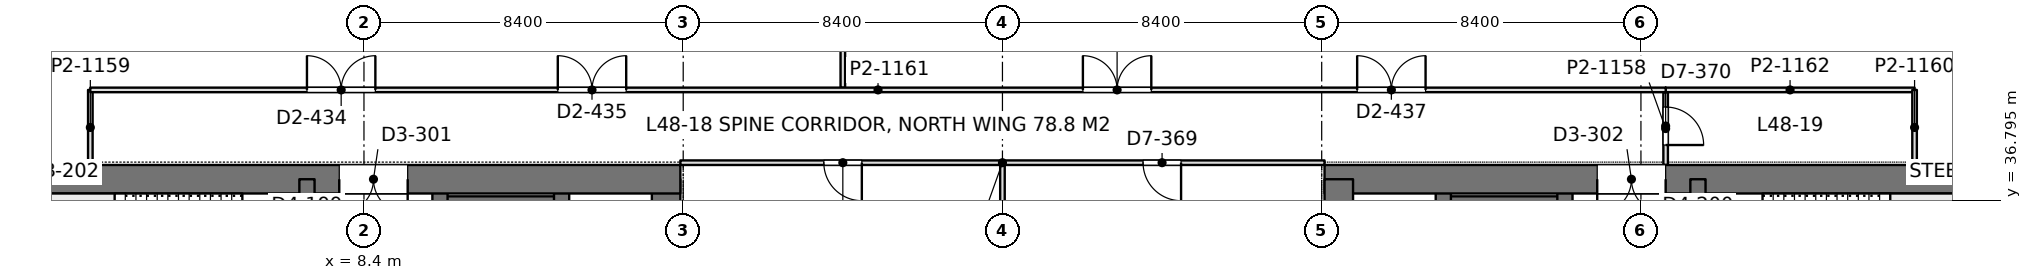
"""IFC4 building model, lengths in metres.
Left out: names, types, materials, properties, quantities, classifications, styles, units other than length and angle.
Written with IfcOpenShell. Run it as: python <this file> out.ifc"""

import sys

from ifc_helpers import new_model, si_unit, direction, frame, frame_2d, origin, place, context, subcontext, project, spatial, rectangle, extrude, element, fill, save


model = new_model("IFC4")
c1 = context("Model", 3, precision=1e-05, world=origin(), true_north=direction((0.0, 1.0)))
c2 = subcontext(c1, "Body", "Model", "MODEL_VIEW")
j1 = project(units=[si_unit("LENGTHUNIT", "METRE"), si_unit("PLANEANGLEUNIT", "RADIAN")], contexts=[c1])
p1 = place(None, origin())
s1 = spatial("IfcSite", under=j1, at=p1, CompositionType="ELEMENT")
p2 = place(p1, origin())
s2 = spatial("IfcBuilding", under=s1, at=p2, CompositionType="ELEMENT")
p3 = place(p2, frame((0.0, 0.0, 211.2)))
s3 = spatial("IfcBuildingStorey", under=s2, at=p3, CompositionType="ELEMENT", Elevation=211.2)
p4 = place(p3, frame((-1.125, 37.35, 0.0), z_axis=(0.0, 0.0, 1.0), x_axis=(1.0, 0.0, 0.0)))
e1 = element("IfcWall", 1, at=p4, inside=s3, PredefinedType="SHEAR", context=c2, shape_type="SweptSolid", body=[
    extrude(rectangle(XDim=17.85, YDim=0.75, at=frame_2d((8.925, 0.0))), origin(), (0.0, 0.0, 1.0), 4.2),
])
p5 = place(p4, frame((8.875, 0.0, 0.0)))
e2 = element("IfcOpeningElement", 2, at=p5, cuts=e1, PredefinedType="OPENING", context=c2, shape_type="SweptSolid", body=[
    extrude(rectangle(XDim=1.8, YDim=2.4, at=frame_2d((0.9, 1.2))), frame((0.0, 0.385, 0.0), z_axis=(0.0, -1.0, 0.0), x_axis=(1.0, 0.0, 0.0)), (0.0, 0.0, 1.0), 0.77),
])
p6 = place(p3, frame((16.35, 27.8, 0.0), z_axis=(0.0, 0.0, 1.0), x_axis=(0.0, 1.0, 0.0)))
e3 = element("IfcWall", 3, at=p6, inside=s3, PredefinedType="SHEAR", context=c2, shape_type="SweptSolid", body=[
    extrude(rectangle(XDim=9.55, YDim=0.75, at=frame_2d((4.775, 0.0))), origin(), (0.0, 0.0, 1.0), 4.2),
])
p7 = place(p3, frame((6.9, 13.05, 0.0), z_axis=(0.0, 0.0, 1.0), x_axis=(0.0, 1.0, 0.0)))
e4 = element("IfcWall", 4, at=p7, inside=s3, PredefinedType="SHEAR", context=c2, shape_type="SweptSolid", body=[
    extrude(rectangle(XDim=24.3, YDim=0.4, at=frame_2d((12.15, 0.0))), origin(), (0.0, 0.0, 1.0), 4.2),
])
p8 = place(p7, frame((1.3, 0.0, 0.0)))
e5 = element("IfcOpeningElement", 5, at=p8, cuts=e4, PredefinedType="OPENING", context=c2, shape_type="SweptSolid", body=[
    extrude(rectangle(XDim=1.0, YDim=2.2, at=frame_2d((0.5, 1.1))), frame((0.0, 0.21, 0.0), z_axis=(0.0, -1.0, 0.0), x_axis=(1.0, 0.0, 0.0)), (0.0, 0.0, 1.0), 0.42),
])
p9 = place(p7, frame((22.0, 0.0, 0.0)))
e6 = element("IfcOpeningElement", 6, at=p9, cuts=e4, PredefinedType="OPENING", context=c2, shape_type="SweptSolid", body=[
    extrude(rectangle(XDim=1.0, YDim=2.2, at=frame_2d((0.5, 1.1))), frame((0.0, 0.21, 0.0), z_axis=(0.0, -1.0, 0.0), x_axis=(1.0, 0.0, 0.0)), (0.0, 0.0, 1.0), 0.42),
])
p10 = place(p7, frame((5.55, 0.0, 0.0)))
e7 = element("IfcOpeningElement", 7, at=p10, cuts=e4, PredefinedType="OPENING", context=c2, shape_type="SweptSolid", body=[
    extrude(rectangle(XDim=1.0, YDim=2.2, at=frame_2d((0.5, 1.1))), frame((0.0, 0.21, 0.0), z_axis=(0.0, -1.0, 0.0), x_axis=(1.0, 0.0, 0.0)), (0.0, 0.0, 1.0), 0.42),
])
p11 = place(p7, frame((9.55, 0.0, 0.0)))
e8 = element("IfcOpeningElement", 8, at=p11, cuts=e4, PredefinedType="OPENING", context=c2, shape_type="SweptSolid", body=[
    extrude(rectangle(XDim=1.0, YDim=2.2, at=frame_2d((0.5, 1.1))), frame((0.0, 0.21, 0.0), z_axis=(0.0, -1.0, 0.0), x_axis=(1.0, 0.0, 0.0)), (0.0, 0.0, 1.0), 0.42),
])
p12 = place(p7, frame((12.8, 0.0, 0.0)))
e9 = element("IfcOpeningElement", 9, at=p12, cuts=e4, PredefinedType="OPENING", context=c2, shape_type="SweptSolid", body=[
    extrude(rectangle(XDim=1.1, YDim=2.2, at=frame_2d((0.55, 1.1))), frame((0.0, 0.21, 0.0), z_axis=(0.0, -1.0, 0.0), x_axis=(1.0, 0.0, 0.0)), (0.0, 0.0, 1.0), 0.42),
])
p13 = place(p7, frame((15.538, 0.0, 0.0)))
e10 = element("IfcOpeningElement", 10, at=p13, cuts=e4, PredefinedType="OPENING", context=c2, shape_type="SweptSolid", body=[
    extrude(rectangle(XDim=1.1, YDim=2.2, at=frame_2d((0.55, 1.1))), frame((0.0, 0.21, 0.0), z_axis=(0.0, -1.0, 0.0), x_axis=(1.0, 0.0, 0.0)), (0.0, 0.0, 1.0), 0.42),
])
p14 = place(p7, frame((18.262, 0.0, 0.0)))
e11 = element("IfcOpeningElement", 11, at=p14, cuts=e4, PredefinedType="OPENING", context=c2, shape_type="SweptSolid", body=[
    extrude(rectangle(XDim=1.1, YDim=2.2, at=frame_2d((0.55, 1.1))), frame((0.0, 0.21, 0.0), z_axis=(0.0, -1.0, 0.0), x_axis=(1.0, 0.0, 0.0)), (0.0, 0.0, 1.0), 0.42),
])
p15 = place(p3, frame((10.4, 13.05, 0.0), z_axis=(0.0, 0.0, 1.0), x_axis=(0.0, 1.0, 0.0)))
e12 = element("IfcWall", 12, at=p15, inside=s3, PredefinedType="SHEAR", context=c2, shape_type="SweptSolid", body=[
    extrude(rectangle(XDim=24.3, YDim=0.4, at=frame_2d((12.15, 0.0))), origin(), (0.0, 0.0, 1.0), 4.2),
])
p16 = place(p15, frame((15.75, 0.0, 0.0)))
e13 = element("IfcOpeningElement", 13, at=p16, cuts=e12, PredefinedType="OPENING", context=c2, shape_type="SweptSolid", body=[
    extrude(rectangle(XDim=1.1, YDim=2.2, at=frame_2d((0.55, 1.1))), frame((0.0, 0.21, 0.0), z_axis=(0.0, -1.0, 0.0), x_axis=(1.0, 0.0, 0.0)), (0.0, 0.0, 1.0), 0.42),
])
p17 = place(p15, frame((18.6, 0.0, 0.0)))
e14 = element("IfcOpeningElement", 14, at=p17, cuts=e12, PredefinedType="OPENING", context=c2, shape_type="SweptSolid", body=[
    extrude(rectangle(XDim=1.1, YDim=2.2, at=frame_2d((0.55, 1.1))), frame((0.0, 0.21, 0.0), z_axis=(0.0, -1.0, 0.0), x_axis=(1.0, 0.0, 0.0)), (0.0, 0.0, 1.0), 0.42),
])
p18 = place(p15, frame((21.45, 0.0, 0.0)))
e15 = element("IfcOpeningElement", 15, at=p18, cuts=e12, PredefinedType="OPENING", context=c2, shape_type="SweptSolid", body=[
    extrude(rectangle(XDim=1.1, YDim=2.2, at=frame_2d((0.55, 1.1))), frame((0.0, 0.21, 0.0), z_axis=(0.0, -1.0, 0.0), x_axis=(1.0, 0.0, 0.0)), (0.0, 0.0, 1.0), 0.42),
])
p19 = place(p15, frame((6.05, 0.0, 0.0)))
e16 = element("IfcOpeningElement", 16, at=p19, cuts=e12, PredefinedType="OPENING", context=c2, shape_type="SweptSolid", body=[
    extrude(rectangle(XDim=1.8, YDim=2.4, at=frame_2d((0.9, 1.2))), frame((0.0, 0.21, 0.0), z_axis=(0.0, -1.0, 0.0), x_axis=(1.0, 0.0, 0.0)), (0.0, 0.0, 1.0), 0.42),
])
p20 = place(p15, frame((11.25, 0.0, 0.0)))
e17 = element("IfcOpeningElement", 17, at=p20, cuts=e12, PredefinedType="OPENING", context=c2, shape_type="SweptSolid", body=[
    extrude(rectangle(XDim=1.8, YDim=2.4, at=frame_2d((0.9, 1.2))), frame((0.0, 0.21, 0.0), z_axis=(0.0, -1.0, 0.0), x_axis=(1.0, 0.0, 0.0)), (0.0, 0.0, 1.0), 0.42),
])
p21 = place(p3, frame((13.6, 27.925, 0.0), z_axis=(0.0, 0.0, 1.0), x_axis=(0.0, 1.0, 0.0)))
e18 = element("IfcWall", 18, at=p21, inside=s3, PredefinedType="SHEAR", context=c2, shape_type="SweptSolid", body=[
    extrude(rectangle(XDim=9.425, YDim=0.4, at=frame_2d((4.712, 0.0))), origin(), (0.0, 0.0, 1.0), 4.2),
])
p22 = place(p3, frame((10.4, 36.625, 0.0), z_axis=(0.0, 0.0, 1.0), x_axis=(1.0, 0.0, 0.0)))
e19 = element("IfcWall", 19, at=p22, inside=s3, PredefinedType="SHEAR", context=c2, shape_type="SweptSolid", body=[
    extrude(rectangle(XDim=3.2, YDim=0.55, at=frame_2d((1.6, 0.0))), origin(), (0.0, 0.0, 1.0), 4.2),
])
p23 = place(p3, frame((33.675, 37.35, 0.0), z_axis=(0.0, 0.0, 1.0), x_axis=(1.0, 0.0, 0.0)))
e20 = element("IfcWall", 20, at=p23, inside=s3, PredefinedType="SHEAR", context=c2, shape_type="SweptSolid", body=[
    extrude(rectangle(XDim=17.85, YDim=0.75, at=frame_2d((8.925, 0.0))), origin(), (0.0, 0.0, 1.0), 4.2),
])
p24 = place(p23, frame((7.175, 0.0, 0.0)))
e21 = element("IfcOpeningElement", 21, at=p24, cuts=e20, PredefinedType="OPENING", context=c2, shape_type="SweptSolid", body=[
    extrude(rectangle(XDim=1.8, YDim=2.4, at=frame_2d((0.9, 1.2))), frame((0.0, 0.385, 0.0), z_axis=(0.0, -1.0, 0.0), x_axis=(1.0, 0.0, 0.0)), (0.0, 0.0, 1.0), 0.77),
])
p25 = place(p3, frame((34.05, 27.8, 0.0), z_axis=(0.0, 0.0, 1.0), x_axis=(0.0, 1.0, 0.0)))
e22 = element("IfcWall", 22, at=p25, inside=s3, PredefinedType="SHEAR", context=c2, shape_type="SweptSolid", body=[
    extrude(rectangle(XDim=9.55, YDim=0.75, at=frame_2d((4.775, 0.0))), origin(), (0.0, 0.0, 1.0), 4.2),
])
p26 = place(p3, frame((43.5, 13.05, 0.0), z_axis=(0.0, 0.0, 1.0), x_axis=(0.0, 1.0, 0.0)))
e23 = element("IfcWall", 23, at=p26, inside=s3, PredefinedType="SHEAR", context=c2, shape_type="SweptSolid", body=[
    extrude(rectangle(XDim=24.3, YDim=0.4, at=frame_2d((12.15, 0.0))), origin(), (0.0, 0.0, 1.0), 4.2),
])
p27 = place(p26, frame((1.3, 0.0, 0.0)))
e24 = element("IfcOpeningElement", 24, at=p27, cuts=e23, PredefinedType="OPENING", context=c2, shape_type="SweptSolid", body=[
    extrude(rectangle(XDim=1.0, YDim=2.2, at=frame_2d((0.5, 1.1))), frame((0.0, 0.21, 0.0), z_axis=(0.0, -1.0, 0.0), x_axis=(1.0, 0.0, 0.0)), (0.0, 0.0, 1.0), 0.42),
])
p28 = place(p26, frame((22.0, 0.0, 0.0)))
e25 = element("IfcOpeningElement", 25, at=p28, cuts=e23, PredefinedType="OPENING", context=c2, shape_type="SweptSolid", body=[
    extrude(rectangle(XDim=1.0, YDim=2.2, at=frame_2d((0.5, 1.1))), frame((0.0, 0.21, 0.0), z_axis=(0.0, -1.0, 0.0), x_axis=(1.0, 0.0, 0.0)), (0.0, 0.0, 1.0), 0.42),
])
p29 = place(p26, frame((5.55, 0.0, 0.0)))
e26 = element("IfcOpeningElement", 26, at=p29, cuts=e23, PredefinedType="OPENING", context=c2, shape_type="SweptSolid", body=[
    extrude(rectangle(XDim=1.0, YDim=2.2, at=frame_2d((0.5, 1.1))), frame((0.0, 0.21, 0.0), z_axis=(0.0, -1.0, 0.0), x_axis=(1.0, 0.0, 0.0)), (0.0, 0.0, 1.0), 0.42),
])
p30 = place(p26, frame((9.55, 0.0, 0.0)))
e27 = element("IfcOpeningElement", 27, at=p30, cuts=e23, PredefinedType="OPENING", context=c2, shape_type="SweptSolid", body=[
    extrude(rectangle(XDim=1.0, YDim=2.2, at=frame_2d((0.5, 1.1))), frame((0.0, 0.21, 0.0), z_axis=(0.0, -1.0, 0.0), x_axis=(1.0, 0.0, 0.0)), (0.0, 0.0, 1.0), 0.42),
])
p31 = place(p26, frame((12.8, 0.0, 0.0)))
e28 = element("IfcOpeningElement", 28, at=p31, cuts=e23, PredefinedType="OPENING", context=c2, shape_type="SweptSolid", body=[
    extrude(rectangle(XDim=1.1, YDim=2.2, at=frame_2d((0.55, 1.1))), frame((0.0, 0.21, 0.0), z_axis=(0.0, -1.0, 0.0), x_axis=(1.0, 0.0, 0.0)), (0.0, 0.0, 1.0), 0.42),
])
p32 = place(p26, frame((15.538, 0.0, 0.0)))
e29 = element("IfcOpeningElement", 29, at=p32, cuts=e23, PredefinedType="OPENING", context=c2, shape_type="SweptSolid", body=[
    extrude(rectangle(XDim=1.1, YDim=2.2, at=frame_2d((0.55, 1.1))), frame((0.0, 0.21, 0.0), z_axis=(0.0, -1.0, 0.0), x_axis=(1.0, 0.0, 0.0)), (0.0, 0.0, 1.0), 0.42),
])
p33 = place(p26, frame((18.262, 0.0, 0.0)))
e30 = element("IfcOpeningElement", 30, at=p33, cuts=e23, PredefinedType="OPENING", context=c2, shape_type="SweptSolid", body=[
    extrude(rectangle(XDim=1.1, YDim=2.2, at=frame_2d((0.55, 1.1))), frame((0.0, 0.21, 0.0), z_axis=(0.0, -1.0, 0.0), x_axis=(1.0, 0.0, 0.0)), (0.0, 0.0, 1.0), 0.42),
])
p34 = place(p3, frame((40.0, 13.05, 0.0), z_axis=(0.0, 0.0, 1.0), x_axis=(0.0, 1.0, 0.0)))
e31 = element("IfcWall", 31, at=p34, inside=s3, PredefinedType="SHEAR", context=c2, shape_type="SweptSolid", body=[
    extrude(rectangle(XDim=24.3, YDim=0.4, at=frame_2d((12.15, 0.0))), origin(), (0.0, 0.0, 1.0), 4.2),
])
p35 = place(p34, frame((15.75, 0.0, 0.0)))
e32 = element("IfcOpeningElement", 32, at=p35, cuts=e31, PredefinedType="OPENING", context=c2, shape_type="SweptSolid", body=[
    extrude(rectangle(XDim=1.1, YDim=2.2, at=frame_2d((0.55, 1.1))), frame((0.0, 0.21, 0.0), z_axis=(0.0, -1.0, 0.0), x_axis=(1.0, 0.0, 0.0)), (0.0, 0.0, 1.0), 0.42),
])
p36 = place(p34, frame((18.6, 0.0, 0.0)))
e33 = element("IfcOpeningElement", 33, at=p36, cuts=e31, PredefinedType="OPENING", context=c2, shape_type="SweptSolid", body=[
    extrude(rectangle(XDim=1.1, YDim=2.2, at=frame_2d((0.55, 1.1))), frame((0.0, 0.21, 0.0), z_axis=(0.0, -1.0, 0.0), x_axis=(1.0, 0.0, 0.0)), (0.0, 0.0, 1.0), 0.42),
])
p37 = place(p34, frame((21.45, 0.0, 0.0)))
e34 = element("IfcOpeningElement", 34, at=p37, cuts=e31, PredefinedType="OPENING", context=c2, shape_type="SweptSolid", body=[
    extrude(rectangle(XDim=1.1, YDim=2.2, at=frame_2d((0.55, 1.1))), frame((0.0, 0.21, 0.0), z_axis=(0.0, -1.0, 0.0), x_axis=(1.0, 0.0, 0.0)), (0.0, 0.0, 1.0), 0.42),
])
p38 = place(p34, frame((6.05, 0.0, 0.0)))
e35 = element("IfcOpeningElement", 35, at=p38, cuts=e31, PredefinedType="OPENING", context=c2, shape_type="SweptSolid", body=[
    extrude(rectangle(XDim=1.8, YDim=2.4, at=frame_2d((0.9, 1.2))), frame((0.0, 0.21, 0.0), z_axis=(0.0, -1.0, 0.0), x_axis=(1.0, 0.0, 0.0)), (0.0, 0.0, 1.0), 0.42),
])
p39 = place(p34, frame((11.25, 0.0, 0.0)))
e36 = element("IfcOpeningElement", 36, at=p39, cuts=e31, PredefinedType="OPENING", context=c2, shape_type="SweptSolid", body=[
    extrude(rectangle(XDim=1.8, YDim=2.4, at=frame_2d((0.9, 1.2))), frame((0.0, 0.21, 0.0), z_axis=(0.0, -1.0, 0.0), x_axis=(1.0, 0.0, 0.0)), (0.0, 0.0, 1.0), 0.42),
])
p40 = place(p3, frame((36.8, 27.925, 0.0), z_axis=(0.0, 0.0, 1.0), x_axis=(0.0, 1.0, 0.0)))
e37 = element("IfcWall", 37, at=p40, inside=s3, PredefinedType="SHEAR", context=c2, shape_type="SweptSolid", body=[
    extrude(rectangle(XDim=9.425, YDim=0.4, at=frame_2d((4.712, 0.0))), origin(), (0.0, 0.0, 1.0), 4.2),
])
p41 = place(p3, frame((40.0, 36.625, 0.0), z_axis=(0.0, 0.0, 1.0), x_axis=(-1.0, 0.0, 0.0)))
e38 = element("IfcWall", 38, at=p41, inside=s3, PredefinedType="SHEAR", context=c2, shape_type="SweptSolid", body=[
    extrude(rectangle(XDim=3.2, YDim=0.55, at=frame_2d((1.6, 0.0))), origin(), (0.0, 0.0, 1.0), 4.2),
])
p42 = place(p3, frame((21.0, 39.758, 0.0), z_axis=(0.0, 0.0, 1.0), x_axis=(0.0, 1.0, 0.0)))
e39 = element("IfcWall", 39, at=p42, inside=s3, PredefinedType="PARTITIONING", context=c2, shape_type="SweptSolid", body=[
    extrude(rectangle(XDim=5.944, YDim=0.12, at=frame_2d((2.972, 0.0))), origin(), (0.0, 0.0, 1.0), 3.55),
])
p43 = place(p3, frame((1.2, 39.7, 0.0), z_axis=(0.0, 0.0, 1.0), x_axis=(1.0, 0.0, 0.0)))
e40 = element("IfcWall", 40, at=p43, inside=s3, PredefinedType="PARTITIONING", context=c2, shape_type="SweptSolid", body=[
    extrude(rectangle(XDim=41.452, YDim=0.12, at=frame_2d((20.726, 0.0))), origin(), (0.0, 0.0, 1.0), 3.55),
])
p44 = place(p43, frame((5.7, 0.0, 0.0)))
e41 = element("IfcOpeningElement", 41, at=p44, cuts=e40, PredefinedType="OPENING", context=c2, shape_type="SweptSolid", body=[
    extrude(rectangle(XDim=1.8, YDim=2.2, at=frame_2d((0.9, 1.1))), frame((0.0, 0.07, 0.0), z_axis=(0.0, -1.0, 0.0), x_axis=(1.0, 0.0, 0.0)), (0.0, 0.0, 1.0), 0.14),
])
p45 = place(p43, frame((12.3, 0.0, 0.0)))
e42 = element("IfcOpeningElement", 42, at=p45, cuts=e40, PredefinedType="OPENING", context=c2, shape_type="SweptSolid", body=[
    extrude(rectangle(XDim=1.8, YDim=2.2, at=frame_2d((0.9, 1.1))), frame((0.0, 0.07, 0.0), z_axis=(0.0, -1.0, 0.0), x_axis=(1.0, 0.0, 0.0)), (0.0, 0.0, 1.0), 0.14),
])
p46 = place(p43, frame((26.117, 0.0, 0.0)))
e43 = element("IfcOpeningElement", 43, at=p46, cuts=e40, PredefinedType="OPENING", context=c2, shape_type="SweptSolid", body=[
    extrude(rectangle(XDim=1.8, YDim=2.2, at=frame_2d((0.9, 1.1))), frame((0.0, 0.07, 0.0), z_axis=(0.0, -1.0, 0.0), x_axis=(1.0, 0.0, 0.0)), (0.0, 0.0, 1.0), 0.14),
])
p47 = place(p43, frame((33.333, 0.0, 0.0)))
e44 = element("IfcOpeningElement", 44, at=p47, cuts=e40, PredefinedType="OPENING", context=c2, shape_type="SweptSolid", body=[
    extrude(rectangle(XDim=1.8, YDim=2.2, at=frame_2d((0.9, 1.1))), frame((0.0, 0.07, 0.0), z_axis=(0.0, -1.0, 0.0), x_axis=(1.0, 0.0, 0.0)), (0.0, 0.0, 1.0), 0.14),
])
p48 = place(p3, frame((1.2, 37.724, 0.0), z_axis=(0.0, 0.0, 1.0), x_axis=(0.0, 1.0, 0.0)))
e45 = element("IfcWall", 45, at=p48, inside=s3, PredefinedType="PARTITIONING", context=c2, shape_type="SweptSolid", body=[
    extrude(rectangle(XDim=1.976, YDim=0.12, at=frame_2d((0.988, 0.0))), origin(), (0.0, 0.0, 1.0), 4.05),
])
p49 = place(p3, frame((42.65, 37.724, 0.0), z_axis=(0.0, 0.0, 1.0), x_axis=(0.0, 1.0, 0.0)))
e46 = element("IfcWall", 46, at=p49, inside=s3, PredefinedType="PARTITIONING", context=c2, shape_type="SweptSolid", body=[
    extrude(rectangle(XDim=1.918, YDim=0.12, at=frame_2d((0.959, 0.0))), origin(), (0.0, 0.0, 1.0), 4.05),
])
p50 = place(p49, frame((0.526, 0.0, 0.0)))
e47 = element("IfcOpeningElement", 47, at=p50, cuts=e46, PredefinedType="OPENING", context=c2, shape_type="SweptSolid", body=[
    extrude(rectangle(XDim=1.0, YDim=2.4, at=frame_2d((0.5, 1.2))), frame((0.0, 0.07, 0.0), z_axis=(0.0, -1.0, 0.0), x_axis=(1.0, 0.0, 0.0)), (0.0, 0.0, 1.0), 0.14),
])
p51 = place(p3, frame((42.648, 39.7, 0.0), z_axis=(0.0, 0.0, 1.0), x_axis=(1.0, 0.0, 0.0)))
e48 = element("IfcWall", 48, at=p51, inside=s3, PredefinedType="PARTITIONING", context=c2, shape_type="SweptSolid", body=[
    extrude(rectangle(XDim=6.552, YDim=0.12, at=frame_2d((3.276, 0.0))), origin(), (0.0, 0.0, 1.0), 3.69),
])
p52 = place(p3, frame((49.2, 37.724, 0.0), z_axis=(0.0, 0.0, 1.0), x_axis=(0.0, 1.0, 0.0)))
e49 = element("IfcWall", 49, at=p52, inside=s3, PredefinedType="PARTITIONING", context=c2, shape_type="SweptSolid", body=[
    extrude(rectangle(XDim=1.976, YDim=0.12, at=frame_2d((0.988, 0.0))), origin(), (0.0, 0.0, 1.0), 4.05),
])
p53 = place(p3, frame((25.2, 34.149, 0.0), z_axis=(0.0, 0.0, 1.0), x_axis=(0.0, 1.0, 0.0)))
e50 = element("IfcWall", 50, at=p53, inside=s3, PredefinedType="PARTITIONING", context=c2, shape_type="SweptSolid", body=[
    extrude(rectangle(XDim=3.593, YDim=0.12, at=frame_2d((1.796, 0.0))), origin(), (0.0, 0.0, 1.0), 3.55),
])
p54 = place(p3, frame((16.725, 37.785, 0.0), z_axis=(0.0, 0.0, 1.0), x_axis=(1.0, 0.0, 0.0)))
e51 = element("IfcWall", 51, at=p54, inside=s3, PredefinedType="PARTITIONING", context=c2, shape_type="SweptSolid", body=[
    extrude(rectangle(XDim=16.95, YDim=0.12, at=frame_2d((8.475, 0.0))), origin(), (0.0, 0.0, 1.0), 3.55),
])
p55 = place(p54, frame((3.775, 0.0, 0.0)))
e52 = element("IfcOpeningElement", 52, at=p55, cuts=e51, PredefinedType="OPENING", context=c2, shape_type="SweptSolid", body=[
    extrude(rectangle(XDim=1.0, YDim=2.4, at=frame_2d((0.5, 1.2))), frame((0.0, 0.07, 0.0), z_axis=(0.0, -1.0, 0.0), x_axis=(1.0, 0.0, 0.0)), (0.0, 0.0, 1.0), 0.14),
])
p56 = place(p54, frame((12.175, 0.0, 0.0)))
e53 = element("IfcOpeningElement", 53, at=p56, cuts=e51, PredefinedType="OPENING", context=c2, shape_type="SweptSolid", body=[
    extrude(rectangle(XDim=1.0, YDim=2.4, at=frame_2d((0.5, 1.2))), frame((0.0, 0.07, 0.0), z_axis=(0.0, -1.0, 0.0), x_axis=(1.0, 0.0, 0.0)), (0.0, 0.0, 1.0), 0.14),
])
p57 = place(p5, frame((1.8, 0.0, 0.0), z_axis=(0.0, 0.0, 1.0), x_axis=(-1.0, 0.0, 0.0)))
e54 = element("IfcDoor", 54, at=p57, inside=s3, OperationType="DOUBLE_DOOR_SINGLE_SWING", PredefinedType="DOOR", context=c2, shape_type="SweptSolid", body=[
    extrude(rectangle(XDim=1.8, YDim=2.4, at=frame_2d((0.9, 1.2))), frame((0.0, 0.025, 0.0), z_axis=(0.0, -1.0, 0.0), x_axis=(1.0, 0.0, 0.0)), (0.0, 0.0, 1.0), 0.05),
])
fill(e2, e54)
p58 = place(p24, frame((1.8, 0.0, 0.0), z_axis=(0.0, 0.0, 1.0), x_axis=(-1.0, 0.0, 0.0)))
e55 = element("IfcDoor", 55, at=p58, inside=s3, OperationType="DOUBLE_DOOR_SINGLE_SWING", PredefinedType="DOOR", context=c2, shape_type="SweptSolid", body=[
    extrude(rectangle(XDim=1.8, YDim=2.4, at=frame_2d((0.9, 1.2))), frame((0.0, 0.025, 0.0), z_axis=(0.0, -1.0, 0.0), x_axis=(1.0, 0.0, 0.0)), (0.0, 0.0, 1.0), 0.05),
])
fill(e21, e55)
p59 = place(p44, origin())
e56 = element("IfcDoor", 56, at=p59, inside=s3, OperationType="DOUBLE_DOOR_SINGLE_SWING", PredefinedType="DOOR", context=c2, shape_type="SweptSolid", body=[
    extrude(rectangle(XDim=1.8, YDim=2.2, at=frame_2d((0.9, 1.1))), frame((0.0, 0.025, 0.0), z_axis=(0.0, -1.0, 0.0), x_axis=(1.0, 0.0, 0.0)), (0.0, 0.0, 1.0), 0.05),
])
fill(e41, e56)
p60 = place(p45, origin())
e57 = element("IfcDoor", 57, at=p60, inside=s3, OperationType="DOUBLE_DOOR_SINGLE_SWING", PredefinedType="DOOR", context=c2, shape_type="SweptSolid", body=[
    extrude(rectangle(XDim=1.8, YDim=2.2, at=frame_2d((0.9, 1.1))), frame((0.0, 0.025, 0.0), z_axis=(0.0, -1.0, 0.0), x_axis=(1.0, 0.0, 0.0)), (0.0, 0.0, 1.0), 0.05),
])
fill(e42, e57)
p61 = place(p46, origin())
e58 = element("IfcDoor", 58, at=p61, inside=s3, OperationType="DOUBLE_DOOR_SINGLE_SWING", PredefinedType="DOOR", context=c2, shape_type="SweptSolid", body=[
    extrude(rectangle(XDim=1.8, YDim=2.2, at=frame_2d((0.9, 1.1))), frame((0.0, 0.025, 0.0), z_axis=(0.0, -1.0, 0.0), x_axis=(1.0, 0.0, 0.0)), (0.0, 0.0, 1.0), 0.05),
])
fill(e43, e58)
p62 = place(p47, origin())
e59 = element("IfcDoor", 59, at=p62, inside=s3, OperationType="DOUBLE_DOOR_SINGLE_SWING", PredefinedType="DOOR", context=c2, shape_type="SweptSolid", body=[
    extrude(rectangle(XDim=1.8, YDim=2.2, at=frame_2d((0.9, 1.1))), frame((0.0, 0.025, 0.0), z_axis=(0.0, -1.0, 0.0), x_axis=(1.0, 0.0, 0.0)), (0.0, 0.0, 1.0), 0.05),
])
fill(e44, e59)
p63 = place(p50, frame((1.0, 0.0, 0.0), z_axis=(0.0, 0.0, 1.0), x_axis=(-1.0, 0.0, 0.0)))
e60 = element("IfcDoor", 60, at=p63, inside=s3, OperationType="SINGLE_SWING_RIGHT", PredefinedType="DOOR", context=c2, shape_type="SweptSolid", body=[
    extrude(rectangle(XDim=1.0, YDim=2.4, at=frame_2d((0.5, 1.2))), frame((0.0, 0.025, 0.0), z_axis=(0.0, -1.0, 0.0), x_axis=(1.0, 0.0, 0.0)), (0.0, 0.0, 1.0), 0.05),
])
fill(e47, e60)
p64 = place(p55, frame((1.0, 0.0, 0.0), z_axis=(0.0, 0.0, 1.0), x_axis=(-1.0, 0.0, 0.0)))
e61 = element("IfcDoor", 61, at=p64, inside=s3, OperationType="SINGLE_SWING_LEFT", PredefinedType="DOOR", context=c2, shape_type="SweptSolid", body=[
    extrude(rectangle(XDim=1.0, YDim=2.4, at=frame_2d((0.5, 1.2))), frame((0.0, 0.025, 0.0), z_axis=(0.0, -1.0, 0.0), x_axis=(1.0, 0.0, 0.0)), (0.0, 0.0, 1.0), 0.05),
])
fill(e52, e61)
p65 = place(p56, frame((1.0, 0.0, 0.0), z_axis=(0.0, 0.0, 1.0), x_axis=(-1.0, 0.0, 0.0)))
e62 = element("IfcDoor", 62, at=p65, inside=s3, OperationType="SINGLE_SWING_LEFT", PredefinedType="DOOR", context=c2, shape_type="SweptSolid", body=[
    extrude(rectangle(XDim=1.0, YDim=2.4, at=frame_2d((0.5, 1.2))), frame((0.0, 0.025, 0.0), z_axis=(0.0, -1.0, 0.0), x_axis=(1.0, 0.0, 0.0)), (0.0, 0.0, 1.0), 0.05),
])
fill(e53, e62)
save(model, sys.argv[1])
